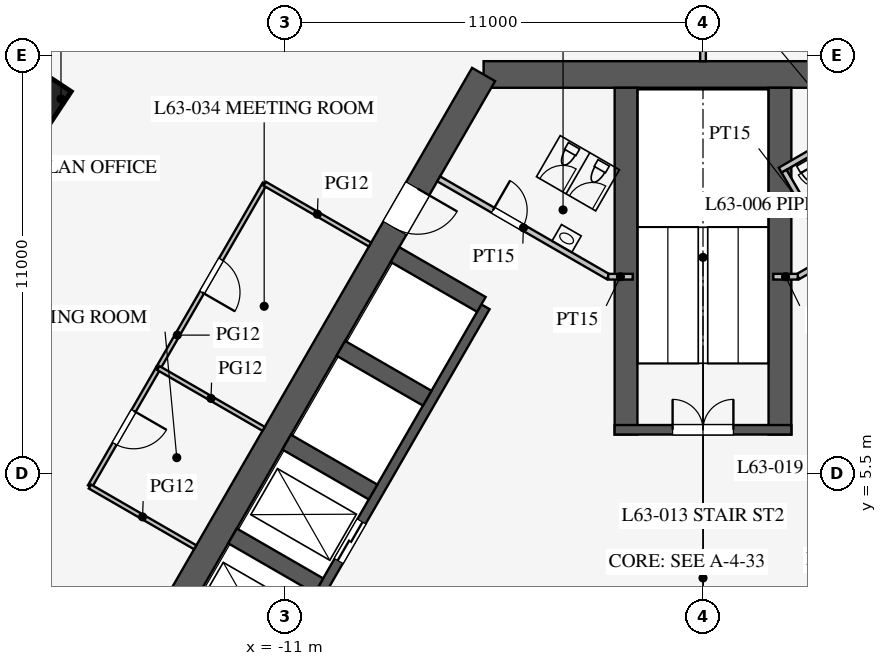
"""IFC4 building model, lengths in metres.
Left out: names, types, materials, properties, quantities, classifications, styles, units other than length and angle.
Written with IfcOpenShell. Run it as: python <this file> out.ifc"""

import sys

from ifc_helpers import new_model, si_unit, direction, frame, frame_2d, origin, origin_2d, place, context, subcontext, project, spatial, rectangle, extrude, element, fill, save


model = new_model("IFC4")
c1 = context("Model", 3, precision=1e-05, world=origin(), true_north=direction((0.0, 1.0)))
c2 = subcontext(c1, "Body", "Model", "MODEL_VIEW")
j1 = project(units=[si_unit("LENGTHUNIT", "METRE"), si_unit("PLANEANGLEUNIT", "RADIAN")], contexts=[c1])
p1 = place(None, origin())
s1 = spatial("IfcSite", under=j1, at=p1, CompositionType="ELEMENT")
p2 = place(p1, origin())
s2 = spatial("IfcBuilding", under=s1, at=p2, CompositionType="ELEMENT")
p3 = place(p2, frame((0.0, 0.0, 276.3)))
s3 = spatial("IfcBuildingStorey", under=s2, at=p3, CompositionType="ELEMENT", Elevation=276.3)
p4 = place(p3, frame((-17.594, 15.354, 0.0), z_axis=(0.0, 0.0, 1.0), x_axis=(-0.551523797289, -0.834159158089, 0.0)))
e1 = element("IfcColumn", 1, at=p4, inside=s3, PredefinedType="COLUMN", context=c2, shape_type="SweptSolid", body=[
    extrude(rectangle(XDim=1.4, YDim=1.4, at=origin_2d()), origin(), (0.0, 0.0, 1.0), 4.2),
])
p5 = place(p3, frame((5.773, 16.0, 0.0), z_axis=(0.0, 0.0, 1.0), x_axis=(-1.0, 0.0, 0.0)))
e2 = element("IfcWall", 2, at=p5, inside=s3, PredefinedType="SHEAR", context=c2, shape_type="SweptSolid", body=[
    extrude(rectangle(XDim=11.547, YDim=0.7, at=frame_2d((5.773, 0.0))), origin(), (0.0, 0.0, 1.0), 4.2),
])
p6 = place(p3, frame((-5.773, 16.0, 0.0), z_axis=(0.0, 0.0, 1.0), x_axis=(-0.500002442456, -0.866023993627, 0.0)))
e3 = element("IfcWall", 3, at=p6, inside=s3, PredefinedType="SHEAR", context=c2, shape_type="SweptSolid", body=[
    extrude(rectangle(XDim=21.939, YDim=0.7, at=frame_2d((10.97, 0.0))), origin(), (0.0, 0.0, 1.0), 4.2),
])
p7 = place(p6, frame((17.27, 0.0, 0.0)))
e4 = element("IfcOpeningElement", 4, at=p7, cuts=e3, PredefinedType="OPENING", context=c2, shape_type="SweptSolid", body=[
    extrude(rectangle(XDim=1.2, YDim=2.1, at=frame_2d((0.6, 1.05))), frame((0.0, 0.36, 0.0), z_axis=(0.0, -1.0, 0.0), x_axis=(1.0, 0.0, 0.0)), (0.0, 0.0, 1.0), 0.72),
])
p8 = place(p6, frame((3.47, 0.0, 0.0)))
e5 = element("IfcOpeningElement", 5, at=p8, cuts=e3, PredefinedType="OPENING", context=c2, shape_type="SweptSolid", body=[
    extrude(rectangle(XDim=1.2, YDim=2.1, at=frame_2d((0.6, 1.05))), frame((0.0, 0.36, 0.0), z_axis=(0.0, -1.0, 0.0), x_axis=(1.0, 0.0, 0.0)), (0.0, 0.0, 1.0), 0.72),
])
p9 = place(p3, frame((-5.724, 9.886, 0.0), z_axis=(0.0, 0.0, 1.0), x_axis=(-0.500001763848, -0.866024385424, 0.0)))
e6 = element("IfcWall", 6, at=p9, inside=s3, PredefinedType="SHEAR", context=c2, shape_type="SweptSolid", body=[
    extrude(rectangle(XDim=11.4, YDim=0.25, at=frame_2d((5.7, 0.0))), origin(), (0.0, 0.0, 1.0), 4.2),
])
p10 = place(p9, frame((6.525, 0.0, 0.0)))
e7 = element("IfcOpeningElement", 7, at=p10, cuts=e6, PredefinedType="OPENING", context=c2, shape_type="SweptSolid", body=[
    extrude(rectangle(XDim=1.2, YDim=2.2, at=frame_2d((0.6, 1.1))), frame((0.0, 0.135, 0.0), z_axis=(0.0, -1.0, 0.0), x_axis=(1.0, 0.0, 0.0)), (0.0, 0.0, 1.0), 0.27),
])
p11 = place(p9, frame((9.375, 0.0, 0.0)))
e8 = element("IfcOpeningElement", 8, at=p11, cuts=e6, PredefinedType="OPENING", context=c2, shape_type="SweptSolid", body=[
    extrude(rectangle(XDim=1.2, YDim=2.2, at=frame_2d((0.6, 1.1))), frame((0.0, 0.135, 0.0), z_axis=(0.0, -1.0, 0.0), x_axis=(1.0, 0.0, 0.0)), (0.0, 0.0, 1.0), 0.27),
])
for number, where, z_axis, x_axis in (
    (9, (-5.832, 9.949, 0.0), (0.0, 0.0, 1.0), (-0.866, 0.5, 0.0)),
    (10, (-7.257, 7.481, 0.0), (0.0, 0.0, 1.0), (-0.866, 0.5, 0.0)),
    (11, (-8.682, 5.012, 0.0), (0.0, 0.0, 1.0), (-0.866, 0.5, 0.0)),
    (12, (-10.107, 2.544, 0.0), (0.0, 0.0, 1.0), (-0.866, 0.5, 0.0)),
):
    element("IfcWall", number, at=place(p3, frame(where, z_axis=z_axis, x_axis=x_axis)), inside=s3, PredefinedType="SHEAR", context=c2, shape_type="SweptSolid", body=[
        extrude(rectangle(XDim=2.625, YDim=0.45, at=frame_2d((1.312, 0.0))), origin(), (0.0, 0.0, 1.0), 4.2),
    ])
for number, where, z_axis, x_axis in (
    (13, (2.025, 6.525, 0.0), (0.0, 0.0, 1.0), (0.0, 1.0, 0.0)),
    (14, (-2.025, 6.525, 0.0), (0.0, 0.0, 1.0), (0.0, 1.0, 0.0)),
):
    element("IfcWall", number, at=place(p3, frame(where, z_axis=z_axis, x_axis=x_axis)), inside=s3, PredefinedType="SHEAR", context=c2, shape_type="SweptSolid", body=[
        extrude(rectangle(XDim=9.125, YDim=0.6, at=frame_2d((4.562, 0.0))), origin(), (0.0, 0.0, 1.0), 4.2),
    ])
p12 = place(p3, frame((2.325, 6.65, 0.0), z_axis=(0.0, 0.0, 1.0), x_axis=(-1.0, 0.0, 0.0)))
e15 = element("IfcWall", 15, at=p12, inside=s3, PredefinedType="SHEAR", context=c2, shape_type="SweptSolid", body=[
    extrude(rectangle(XDim=4.65, YDim=0.25, at=frame_2d((2.325, 0.0))), origin(), (0.0, 0.0, 1.0), 4.2),
])
p13 = place(p12, frame((1.525, 0.0, 0.0)))
e16 = element("IfcOpeningElement", 16, at=p13, cuts=e15, PredefinedType="OPENING", context=c2, shape_type="SweptSolid", body=[
    extrude(rectangle(XDim=1.6, YDim=2.1, at=frame_2d((0.8, 1.05))), frame((0.0, 0.135, 0.0), z_axis=(0.0, -1.0, 0.0), x_axis=(1.0, 0.0, 0.0)), (0.0, 0.0, 1.0), 0.27),
])
p14 = place(p3, frame((2.495, 10.678, 0.0), z_axis=(0.0, 0.0, 1.0), x_axis=(0.866037967349, 0.499978238636, 0.0)))
e17 = element("IfcWall", 17, at=p14, inside=s3, PredefinedType="PARTITIONING", context=c2, shape_type="SweptSolid", body=[
    extrude(rectangle(XDim=5.15, YDim=0.15, at=frame_2d((2.575, 0.0))), origin(), (0.0, 0.0, 1.0), 4.0),
])
p15 = place(p14, frame((1.3, 0.0, 0.0)))
e18 = element("IfcOpeningElement", 18, at=p15, cuts=e17, PredefinedType="OPENING", context=c2, shape_type="SweptSolid", body=[
    extrude(rectangle(XDim=0.9, YDim=2.1, at=frame_2d((0.45, 1.05))), frame((0.0, 0.085, 0.0), z_axis=(0.0, -1.0, 0.0), x_axis=(1.0, 0.0, 0.0)), (0.0, 0.0, 1.0), 0.17),
])
p16 = place(p3, frame((-2.495, 10.678, 0.0), z_axis=(0.0, 0.0, 1.0), x_axis=(-0.866037967349, 0.499978238636, 0.0)))
e19 = element("IfcWall", 19, at=p16, inside=s3, PredefinedType="PARTITIONING", context=c2, shape_type="SweptSolid", body=[
    extrude(rectangle(XDim=5.15, YDim=0.15, at=frame_2d((2.575, 0.0))), origin(), (0.0, 0.0, 1.0), 4.0),
])
p17 = place(p16, frame((2.6, 0.0, 0.0)))
e20 = element("IfcOpeningElement", 20, at=p17, cuts=e19, PredefinedType="OPENING", context=c2, shape_type="SweptSolid", body=[
    extrude(rectangle(XDim=0.9, YDim=2.1, at=frame_2d((0.45, 1.05))), frame((0.0, 0.085, 0.0), z_axis=(0.0, -1.0, 0.0), x_axis=(1.0, 0.0, 0.0)), (0.0, 0.0, 1.0), 0.17),
])
for number, where, z_axis, x_axis in (
    (21, (2.495, 10.678, 0.0), (0.0, 0.0, 1.0), (-1.0, 0.0, 0.0)),
    (22, (-2.495, 10.678, 0.0), (0.0, 0.0, 1.0), (1.0, 0.0, 0.0)),
):
    element("IfcWall", number, at=place(p3, frame(where, z_axis=z_axis, x_axis=x_axis)), inside=s3, PredefinedType="PARTITIONING", context=c2, shape_type="SweptSolid", body=[
        extrude(rectangle(XDim=0.645, YDim=0.15, at=frame_2d((0.323, 0.0))), origin(), (0.0, 0.0, 1.0), 4.0),
    ])
p18 = place(p3, frame((2.031, 13.482, 0.0), z_axis=(0.0, 0.0, 1.0), x_axis=(0.866050731258, 0.499956128963, 0.0)))
e23 = element("IfcWall", 23, at=p18, inside=s3, PredefinedType="PARTITIONING", context=c2, shape_type="SweptSolid", body=[
    extrude(rectangle(XDim=4.1, YDim=0.15, at=frame_2d((2.05, 0.0))), origin(), (0.0, 0.0, 1.0), 4.0),
])
p19 = place(p3, frame((3.389, 11.281, 0.0), z_axis=(0.0, 0.0, 1.0), x_axis=(-0.499989096993, 0.866031698547, 0.0)))
e24 = element("IfcWall", 24, at=p19, inside=s3, PredefinedType="PARTITIONING", context=c2, shape_type="SweptSolid", body=[
    extrude(rectangle(XDim=2.51, YDim=0.15, at=frame_2d((1.255, 0.0))), origin(), (0.0, 0.0, 1.0), 4.0),
])
p20 = place(p3, frame((0.0, 16.35, 0.0), z_axis=(0.0, 0.0, 1.0), x_axis=(0.0, 1.0, 0.0)))
e25 = element("IfcWall", 25, at=p20, inside=s3, PredefinedType="PARTITIONING", context=c2, shape_type="SweptSolid", body=[
    extrude(rectangle(XDim=13.4, YDim=0.15, at=frame_2d((6.7, 0.0))), origin(), (0.0, 0.0, 1.0), 2.5),
])
p21 = place(p3, frame((25.854, -14.361, 0.0), z_axis=(0.0, 0.0, 1.0), x_axis=(-0.499999496503, 0.866025694478, 0.0)))
e26 = element("IfcWall", 26, at=p21, inside=s3, PredefinedType="PARTITIONING", context=c2, shape_type="SweptSolid", body=[
    extrude(rectangle(XDim=50.728, YDim=0.12, at=frame_2d((25.364, 0.0))), origin(), (0.0, 0.0, 1.0), 2.9),
])
p22 = place(p21, frame((9.75, 0.0, 0.15)))
e27 = element("IfcOpeningElement", 27, at=p22, cuts=e26, PredefinedType="OPENING", context=c2, shape_type="SweptSolid", body=[
    extrude(rectangle(XDim=1.8, YDim=2.1, at=frame_2d((0.9, 1.05))), frame((0.0, 0.07, 0.0), z_axis=(0.0, -1.0, 0.0), x_axis=(1.0, 0.0, 0.0)), (0.0, 0.0, 1.0), 0.14),
])
p23 = place(p21, frame((39.2, 0.0, 0.15)))
e28 = element("IfcOpeningElement", 28, at=p23, cuts=e26, PredefinedType="OPENING", context=c2, shape_type="SweptSolid", body=[
    extrude(rectangle(XDim=1.8, YDim=2.1, at=frame_2d((0.9, 1.05))), frame((0.0, 0.07, 0.0), z_axis=(0.0, -1.0, 0.0), x_axis=(1.0, 0.0, 0.0)), (0.0, 0.0, 1.0), 0.14),
])
p24 = place(p3, frame((-14.333, 8.275, 0.0), z_axis=(0.0, 0.0, 1.0), x_axis=(-0.500012057535, -0.866018442252, 0.0)))
e29 = element("IfcWall", 29, at=p24, inside=s3, PredefinedType="PARTITIONING", context=c2, shape_type="SweptSolid", body=[
    extrude(rectangle(XDim=3.6, YDim=0.12, at=frame_2d((1.8, 0.0))), origin(), (0.0, 0.0, 1.0), 2.9),
])
p25 = place(p24, frame((1.3, 0.0, 0.15)))
e30 = element("IfcOpeningElement", 30, at=p25, cuts=e29, PredefinedType="OPENING", context=c2, shape_type="SweptSolid", body=[
    extrude(rectangle(XDim=1.0, YDim=2.1, at=frame_2d((0.5, 1.05))), frame((0.0, 0.07, 0.0), z_axis=(0.0, -1.0, 0.0), x_axis=(1.0, 0.0, 0.0)), (0.0, 0.0, 1.0), 0.14),
])
p26 = place(p3, frame((-11.533, 13.125, 0.0), z_axis=(0.0, 0.0, 1.0), x_axis=(-0.49999793692, -0.866026594901, 0.0)))
e31 = element("IfcWall", 31, at=p26, inside=s3, PredefinedType="PARTITIONING", context=c2, shape_type="SweptSolid", body=[
    extrude(rectangle(XDim=5.6, YDim=0.12, at=frame_2d((2.8, 0.0))), origin(), (0.0, 0.0, 1.0), 2.9),
])
p27 = place(p26, frame((2.3, 0.0, 0.15)))
e32 = element("IfcOpeningElement", 32, at=p27, cuts=e31, PredefinedType="OPENING", context=c2, shape_type="SweptSolid", body=[
    extrude(rectangle(XDim=1.0, YDim=2.1, at=frame_2d((0.5, 1.05))), frame((0.0, 0.07, 0.0), z_axis=(0.0, -1.0, 0.0), x_axis=(1.0, 0.0, 0.0)), (0.0, 0.0, 1.0), 0.14),
])
p28 = place(p3, frame((-13.361, 3.557, 0.0), z_axis=(0.0, 0.0, 1.0), x_axis=(-0.866061088033, 0.499938187974, 0.0)))
e33 = element("IfcWall", 33, at=p28, inside=s3, PredefinedType="PARTITIONING", context=c2, shape_type="SweptSolid", body=[
    extrude(rectangle(XDim=3.2, YDim=0.12, at=frame_2d((1.6, 0.0))), origin(), (0.0, 0.0, 1.0), 2.9),
])
p29 = place(p3, frame((-11.562, 6.675, 0.0), z_axis=(0.0, 0.0, 1.0), x_axis=(-0.866042017984, 0.499971222258, 0.0)))
e34 = element("IfcWall", 34, at=p29, inside=s3, PredefinedType="PARTITIONING", context=c2, shape_type="SweptSolid", body=[
    extrude(rectangle(XDim=3.2, YDim=0.12, at=frame_2d((1.6, 0.0))), origin(), (0.0, 0.0, 1.0), 2.6),
])
p30 = place(p3, frame((-8.761, 11.525, 0.0), z_axis=(0.0, 0.0, 1.0), x_axis=(-0.866008981251, 0.500028443584, 0.0)))
e35 = element("IfcWall", 35, at=p30, inside=s3, PredefinedType="PARTITIONING", context=c2, shape_type="SweptSolid", body=[
    extrude(rectangle(XDim=3.2, YDim=0.12, at=frame_2d((1.6, 0.0))), origin(), (0.0, 0.0, 1.0), 2.9),
])
p31 = place(p17, frame((0.9, 0.0, 0.0), z_axis=(0.0, 0.0, 1.0), x_axis=(-1.0, 0.0, 0.0)))
e36 = element("IfcDoor", 36, at=p31, inside=s3, OperationType="SINGLE_SWING_LEFT", PredefinedType="DOOR", context=c2, shape_type="SweptSolid", body=[
    extrude(rectangle(XDim=0.9, YDim=2.1, at=frame_2d((0.45, 1.05))), frame((0.0, 0.025, 0.0), z_axis=(0.0, -1.0, 0.0), x_axis=(1.0, 0.0, 0.0)), (0.0, 0.0, 1.0), 0.05),
])
fill(e20, e36)
p32 = place(p13, frame((1.6, 0.0, 0.0), z_axis=(0.0, 0.0, 1.0), x_axis=(-1.0, 0.0, 0.0)))
e37 = element("IfcDoor", 37, at=p32, inside=s3, OperationType="DOUBLE_DOOR_SINGLE_SWING", PredefinedType="DOOR", context=c2, shape_type="SweptSolid", body=[
    extrude(rectangle(XDim=1.6, YDim=2.1, at=frame_2d((0.8, 1.05))), frame((0.0, 0.025, 0.0), z_axis=(0.0, -1.0, 0.0), x_axis=(1.0, 0.0, 0.0)), (0.0, 0.0, 1.0), 0.05),
])
fill(e16, e37)
p33 = place(p8, origin())
e38 = element("IfcDoor", 38, at=p33, inside=s3, OperationType="SINGLE_SWING_LEFT", PredefinedType="DOOR", context=c2, shape_type="SweptSolid", body=[
    extrude(rectangle(XDim=1.2, YDim=2.1, at=frame_2d((0.6, 1.05))), frame((0.0, 0.025, 0.0), z_axis=(0.0, -1.0, 0.0), x_axis=(1.0, 0.0, 0.0)), (0.0, 0.0, 1.0), 0.05),
])
fill(e5, e38)
p34 = place(p27, origin())
e39 = element("IfcDoor", 39, at=p34, inside=s3, OperationType="SINGLE_SWING_RIGHT", PredefinedType="DOOR", context=c2, shape_type="SweptSolid", body=[
    extrude(rectangle(XDim=1.0, YDim=2.1, at=frame_2d((0.5, 1.05))), frame((0.0, 0.025, 0.0), z_axis=(0.0, -1.0, 0.0), x_axis=(1.0, 0.0, 0.0)), (0.0, 0.0, 1.0), 0.05),
])
fill(e32, e39)
p35 = place(p25, origin())
e40 = element("IfcDoor", 40, at=p35, inside=s3, OperationType="SINGLE_SWING_LEFT", PredefinedType="DOOR", context=c2, shape_type="SweptSolid", body=[
    extrude(rectangle(XDim=1.0, YDim=2.1, at=frame_2d((0.5, 1.05))), frame((0.0, 0.025, 0.0), z_axis=(0.0, -1.0, 0.0), x_axis=(1.0, 0.0, 0.0)), (0.0, 0.0, 1.0), 0.05),
])
fill(e30, e40)
p36 = place(p10, origin())
e41 = element("IfcDoor", 41, at=p36, inside=s3, OperationType="DOUBLE_DOOR_SLIDING", PredefinedType="DOOR", context=c2, shape_type="SweptSolid", body=[
    extrude(rectangle(XDim=1.2, YDim=2.2, at=frame_2d((0.6, 1.1))), frame((0.0, 0.025, 0.0), z_axis=(0.0, -1.0, 0.0), x_axis=(1.0, 0.0, 0.0)), (0.0, 0.0, 1.0), 0.05),
])
fill(e7, e41)
save(model, sys.argv[1])
